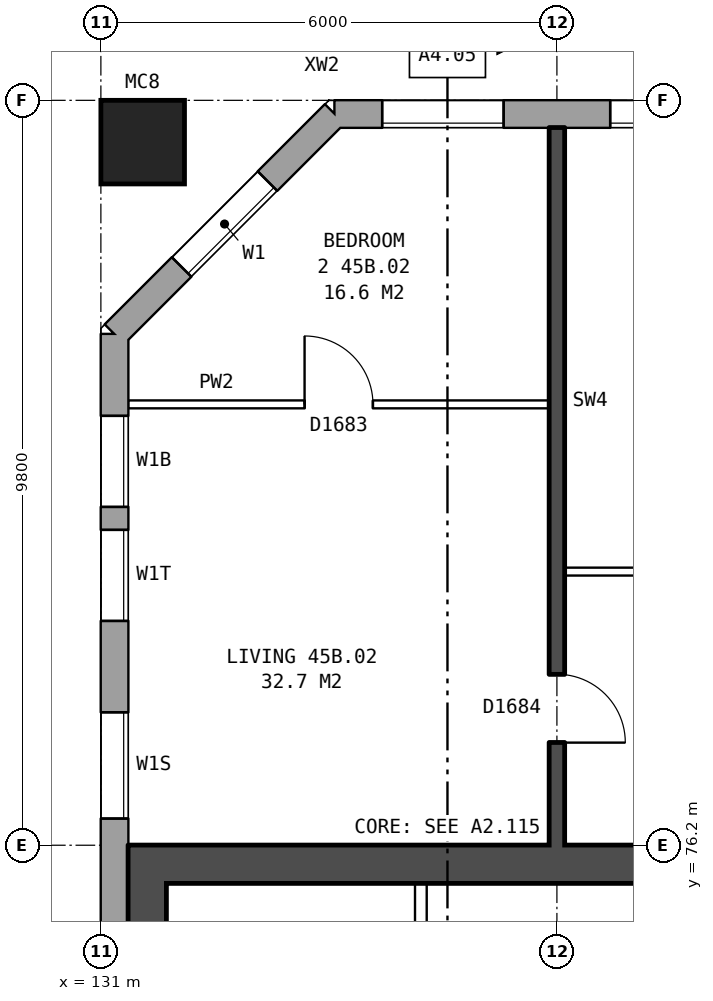
"""IFC4 building model, lengths in metres.
Left out: names, types, materials, properties, quantities, classifications, styles, units other than length and angle.
Written with IfcOpenShell. Run it as: python <this file> out.ifc"""

import sys

from ifc_helpers import new_model, si_unit, direction, frame, frame_2d, origin, origin_2d, place, context, subcontext, project, spatial, rectangle, hollow_rectangle, extrude, element, fill, save


model = new_model("IFC4")
c1 = context("Model", 3, precision=1e-05, world=origin(), true_north=direction((0.0, 1.0)))
c2 = subcontext(c1, "Body", "Model", "MODEL_VIEW")
j1 = project(units=[si_unit("LENGTHUNIT", "METRE"), si_unit("PLANEANGLEUNIT", "RADIAN")], contexts=[c1])
p1 = place(None, origin())
s1 = spatial("IfcSite", under=j1, at=p1, CompositionType="ELEMENT")
p2 = place(p1, origin())
s2 = spatial("IfcBuilding", under=s1, at=p2, CompositionType="ELEMENT")
p3 = place(p2, frame((0.0, 0.0, 160.9)))
s3 = spatial("IfcBuildingStorey", under=s2, at=p3, CompositionType="ELEMENT", Elevation=160.9)
p4 = place(p3, frame((131.55, 85.45, 0.0), z_axis=(0.0, 0.0, 1.0), x_axis=(1.0, 0.0, 0.0)))
e1 = element("IfcColumn", 1, at=p4, inside=s3, PredefinedType="COLUMN", context=c2, shape_type="SweptSolid", body=[
    extrude(hollow_rectangle(XDim=1.1, YDim=1.1, WallThickness=0.06, at=origin_2d()), origin(), (0.0, 0.0, 1.0), 3.1),
])
p5 = place(p3, frame((168.425, 85.82, 0.0), z_axis=(0.0, 0.0, 1.0), x_axis=(-1.0, 0.0, 0.0)))
e2 = element("IfcWall", 2, at=p5, inside=s3, PredefinedType="STANDARD", context=c2, shape_type="SweptSolid", body=[
    extrude(rectangle(XDim=34.351, YDim=0.36, at=frame_2d((17.175, 0.0))), origin(), (0.0, 0.0, 1.0), 2.85),
])
p6 = place(p5, frame((2.125, 0.0, 0.8)))
e3 = element("IfcOpeningElement", 3, at=p6, cuts=e2, PredefinedType="OPENING", context=c2, shape_type="SweptSolid", body=[
    extrude(rectangle(XDim=1.6, YDim=1.8, at=frame_2d((0.8, 0.9))), frame((0.0, 0.19, 0.0), z_axis=(0.0, -1.0, 0.0), x_axis=(1.0, 0.0, 0.0)), (0.0, 0.0, 1.0), 0.38),
])
p7 = place(p5, frame((5.125, 0.0, 0.8)))
e4 = element("IfcOpeningElement", 4, at=p7, cuts=e2, PredefinedType="OPENING", context=c2, shape_type="SweptSolid", body=[
    extrude(rectangle(XDim=1.6, YDim=1.8, at=frame_2d((0.8, 0.9))), frame((0.0, 0.19, 0.0), z_axis=(0.0, -1.0, 0.0), x_axis=(1.0, 0.0, 0.0)), (0.0, 0.0, 1.0), 0.38),
])
p8 = place(p5, frame((8.125, 0.0, 0.8)))
e5 = element("IfcOpeningElement", 5, at=p8, cuts=e2, PredefinedType="OPENING", context=c2, shape_type="SweptSolid", body=[
    extrude(rectangle(XDim=1.6, YDim=1.8, at=frame_2d((0.8, 0.9))), frame((0.0, 0.19, 0.0), z_axis=(0.0, -1.0, 0.0), x_axis=(1.0, 0.0, 0.0)), (0.0, 0.0, 1.0), 0.38),
])
p9 = place(p5, frame((10.025, 0.0, 0.8)))
e6 = element("IfcOpeningElement", 6, at=p9, cuts=e2, PredefinedType="OPENING", context=c2, shape_type="SweptSolid", body=[
    extrude(rectangle(XDim=1.0, YDim=1.8, at=frame_2d((0.5, 0.9))), frame((0.0, 0.19, 0.0), z_axis=(0.0, -1.0, 0.0), x_axis=(1.0, 0.0, 0.0)), (0.0, 0.0, 1.0), 0.38),
])
p10 = place(p5, frame((14.125, 0.0, 0.8)))
e7 = element("IfcOpeningElement", 7, at=p10, cuts=e2, PredefinedType="OPENING", context=c2, shape_type="SweptSolid", body=[
    extrude(rectangle(XDim=1.6, YDim=1.8, at=frame_2d((0.8, 0.9))), frame((0.0, 0.19, 0.0), z_axis=(0.0, -1.0, 0.0), x_axis=(1.0, 0.0, 0.0)), (0.0, 0.0, 1.0), 0.38),
])
p11 = place(p5, frame((17.125, 0.0, 0.8)))
e8 = element("IfcOpeningElement", 8, at=p11, cuts=e2, PredefinedType="OPENING", context=c2, shape_type="SweptSolid", body=[
    extrude(rectangle(XDim=1.6, YDim=1.8, at=frame_2d((0.8, 0.9))), frame((0.0, 0.19, 0.0), z_axis=(0.0, -1.0, 0.0), x_axis=(1.0, 0.0, 0.0)), (0.0, 0.0, 1.0), 0.38),
])
p12 = place(p5, frame((19.625, 0.0, 0.65)))
e9 = element("IfcOpeningElement", 9, at=p12, cuts=e2, PredefinedType="OPENING", context=c2, shape_type="SweptSolid", body=[
    extrude(rectangle(XDim=0.6, YDim=1.8, at=frame_2d((0.3, 0.9))), frame((0.0, 0.19, 0.0), z_axis=(0.0, -1.0, 0.0), x_axis=(1.0, 0.0, 0.0)), (0.0, 0.0, 1.0), 0.38),
])
p13 = place(p5, frame((23.125, 0.0, 0.8)))
e10 = element("IfcOpeningElement", 10, at=p13, cuts=e2, PredefinedType="OPENING", context=c2, shape_type="SweptSolid", body=[
    extrude(rectangle(XDim=1.6, YDim=1.8, at=frame_2d((0.8, 0.9))), frame((0.0, 0.19, 0.0), z_axis=(0.0, -1.0, 0.0), x_axis=(1.0, 0.0, 0.0)), (0.0, 0.0, 1.0), 0.38),
])
p14 = place(p5, frame((26.125, 0.0, 0.8)))
e11 = element("IfcOpeningElement", 11, at=p14, cuts=e2, PredefinedType="OPENING", context=c2, shape_type="SweptSolid", body=[
    extrude(rectangle(XDim=1.6, YDim=1.8, at=frame_2d((0.8, 0.9))), frame((0.0, 0.19, 0.0), z_axis=(0.0, -1.0, 0.0), x_axis=(1.0, 0.0, 0.0)), (0.0, 0.0, 1.0), 0.38),
])
p15 = place(p5, frame((29.125, 0.0, 0.8)))
e12 = element("IfcOpeningElement", 12, at=p15, cuts=e2, PredefinedType="OPENING", context=c2, shape_type="SweptSolid", body=[
    extrude(rectangle(XDim=1.6, YDim=1.8, at=frame_2d((0.8, 0.9))), frame((0.0, 0.19, 0.0), z_axis=(0.0, -1.0, 0.0), x_axis=(1.0, 0.0, 0.0)), (0.0, 0.0, 1.0), 0.38),
])
p16 = place(p5, frame((32.125, 0.0, 0.8)))
e13 = element("IfcOpeningElement", 13, at=p16, cuts=e2, PredefinedType="OPENING", context=c2, shape_type="SweptSolid", body=[
    extrude(rectangle(XDim=1.6, YDim=1.8, at=frame_2d((0.8, 0.9))), frame((0.0, 0.19, 0.0), z_axis=(0.0, -1.0, 0.0), x_axis=(1.0, 0.0, 0.0)), (0.0, 0.0, 1.0), 0.38),
])
p17 = place(p5, frame((11.325, 0.0, 1.7)))
e14 = element("IfcOpeningElement", 14, at=p17, cuts=e2, PredefinedType="OPENING", context=c2, shape_type="SweptSolid", body=[
    extrude(rectangle(XDim=0.8, YDim=0.9, at=frame_2d((0.4, 0.45))), frame((0.0, 0.19, 0.0), z_axis=(0.0, -1.0, 0.0), x_axis=(1.0, 0.0, 0.0)), (0.0, 0.0, 1.0), 0.38),
])
p18 = place(p5, frame((20.525, 0.0, 0.55)))
e15 = element("IfcOpeningElement", 15, at=p18, cuts=e2, PredefinedType="OPENING", context=c2, shape_type="SweptSolid", body=[
    extrude(rectangle(XDim=0.8, YDim=0.9, at=frame_2d((0.4, 0.45))), frame((0.0, 0.19, 0.0), z_axis=(0.0, -1.0, 0.0), x_axis=(1.0, 0.0, 0.0)), (0.0, 0.0, 1.0), 0.38),
])
p19 = place(p3, frame((134.075, 85.82, 0.0), z_axis=(0.0, 0.0, 1.0), x_axis=(-0.707106781187, -0.707106781187, 0.0)))
e16 = element("IfcWall", 16, at=p19, inside=s3, PredefinedType="STANDARD", context=c2, shape_type="SweptSolid", body=[
    extrude(rectangle(XDim=4.094, YDim=0.36, at=frame_2d((2.047, 0.0))), origin(), (0.0, 0.0, 1.0), 2.85),
])
p20 = place(p19, frame((1.247, 0.0, 0.8)))
e17 = element("IfcOpeningElement", 17, at=p20, cuts=e16, PredefinedType="OPENING", context=c2, shape_type="SweptSolid", body=[
    extrude(rectangle(XDim=1.6, YDim=1.8, at=frame_2d((0.8, 0.9))), frame((0.0, 0.19, 0.0), z_axis=(0.0, -1.0, 0.0), x_axis=(1.0, 0.0, 0.0)), (0.0, 0.0, 1.0), 0.38),
])
p21 = place(p3, frame((131.18, 82.925, 0.0), z_axis=(0.0, 0.0, 1.0), x_axis=(0.0, -1.0, 0.0)))
e18 = element("IfcWall", 18, at=p21, inside=s3, PredefinedType="STANDARD", context=c2, shape_type="SweptSolid", body=[
    extrude(rectangle(XDim=25.851, YDim=0.36, at=frame_2d((12.925, 0.0))), origin(), (0.0, 0.0, 1.0), 2.85),
])
p22 = place(p21, frame((1.075, 0.0, 0.8)))
e19 = element("IfcOpeningElement", 19, at=p22, cuts=e18, PredefinedType="OPENING", context=c2, shape_type="SweptSolid", body=[
    extrude(rectangle(XDim=1.2, YDim=1.8, at=frame_2d((0.6, 0.9))), frame((0.0, 0.19, 0.0), z_axis=(0.0, -1.0, 0.0), x_axis=(1.0, 0.0, 0.0)), (0.0, 0.0, 1.0), 0.38),
])
p23 = place(p21, frame((2.575, 0.0, 0.8)))
e20 = element("IfcOpeningElement", 20, at=p23, cuts=e18, PredefinedType="OPENING", context=c2, shape_type="SweptSolid", body=[
    extrude(rectangle(XDim=1.2, YDim=0.9, at=frame_2d((0.6, 0.45))), frame((0.0, 0.19, 0.0), z_axis=(0.0, -1.0, 0.0), x_axis=(1.0, 0.0, 0.0)), (0.0, 0.0, 1.0), 0.38),
])
p24 = place(p21, frame((19.475, 0.0, 1.65)))
e21 = element("IfcOpeningElement", 21, at=p24, cuts=e18, PredefinedType="OPENING", context=c2, shape_type="SweptSolid", body=[
    extrude(rectangle(XDim=1.2, YDim=0.9, at=frame_2d((0.6, 0.45))), frame((0.0, 0.19, 0.0), z_axis=(0.0, -1.0, 0.0), x_axis=(1.0, 0.0, 0.0)), (0.0, 0.0, 1.0), 0.38),
])
p25 = place(p21, frame((22.425, 0.0, 0.8)))
e22 = element("IfcOpeningElement", 22, at=p25, cuts=e18, PredefinedType="OPENING", context=c2, shape_type="SweptSolid", body=[
    extrude(rectangle(XDim=1.0, YDim=1.2, at=frame_2d((0.5, 0.6))), frame((0.0, 0.19, 0.0), z_axis=(0.0, -1.0, 0.0), x_axis=(1.0, 0.0, 0.0)), (0.0, 0.0, 1.0), 0.38),
])
p26 = place(p21, frame((4.975, 0.0, 1.7)))
e23 = element("IfcOpeningElement", 23, at=p26, cuts=e18, PredefinedType="OPENING", context=c2, shape_type="SweptSolid", body=[
    extrude(rectangle(XDim=1.4, YDim=0.9, at=frame_2d((0.7, 0.45))), frame((0.0, 0.19, 0.0), z_axis=(0.0, -1.0, 0.0), x_axis=(1.0, 0.0, 0.0)), (0.0, 0.0, 1.0), 0.38),
])
p27 = place(p21, frame((21.175, 0.0, 0.35)))
e24 = element("IfcOpeningElement", 24, at=p27, cuts=e18, PredefinedType="OPENING", context=c2, shape_type="SweptSolid", body=[
    extrude(rectangle(XDim=0.6, YDim=0.9, at=frame_2d((0.3, 0.45))), frame((0.0, 0.19, 0.0), z_axis=(0.0, -1.0, 0.0), x_axis=(1.0, 0.0, 0.0)), (0.0, 0.0, 1.0), 0.38),
])
p28 = place(p21, frame((23.725, 0.0, 0.8)))
e25 = element("IfcOpeningElement", 25, at=p28, cuts=e18, PredefinedType="OPENING", context=c2, shape_type="SweptSolid", body=[
    extrude(rectangle(XDim=1.4, YDim=1.8, at=frame_2d((0.7, 0.9))), frame((0.0, 0.19, 0.0), z_axis=(0.0, -1.0, 0.0), x_axis=(1.0, 0.0, 0.0)), (0.0, 0.0, 1.0), 0.38),
])
p29 = place(p3, frame((131.61, 63.8, 0.0), z_axis=(0.0, 0.0, 1.0), x_axis=(0.0, 1.0, 0.0)))
e26 = element("IfcWall", 26, at=p29, inside=s3, PredefinedType="SHEAR", context=c2, shape_type="SweptSolid", body=[
    extrude(rectangle(XDim=12.4, YDim=0.5, at=frame_2d((6.2, 0.0))), origin(), (0.0, 0.0, 1.0), 2.85),
])
p30 = place(p3, frame((139.26, 75.95, 0.0), z_axis=(0.0, 0.0, 1.0), x_axis=(-1.0, 0.0, 0.0)))
e27 = element("IfcWall", 27, at=p30, inside=s3, PredefinedType="SHEAR", context=c2, shape_type="SweptSolid", body=[
    extrude(rectangle(XDim=7.4, YDim=0.5, at=frame_2d((3.7, 0.0))), origin(), (0.0, 0.0, 1.0), 2.85),
])
p31 = place(p3, frame((135.21, 71.375, 0.0), z_axis=(0.0, 0.0, 1.0), x_axis=(0.0, 1.0, 0.0)))
e28 = element("IfcWall", 28, at=p31, inside=s3, PredefinedType="PARTITIONING", context=c2, shape_type="SweptSolid", body=[
    extrude(rectangle(XDim=4.325, YDim=0.15, at=frame_2d((2.163, 0.0))), origin(), (0.0, 0.0, 1.0), 2.85),
])
p32 = place(p31, frame((2.65, 0.0, 0.0)))
e29 = element("IfcOpeningElement", 29, at=p32, cuts=e28, PredefinedType="OPENING", context=c2, shape_type="SweptSolid", body=[
    extrude(rectangle(XDim=1.1, YDim=2.1, at=frame_2d((0.55, 1.05))), frame((0.0, 0.085, 0.0), z_axis=(0.0, -1.0, 0.0), x_axis=(1.0, 0.0, 0.0)), (0.0, 0.0, 1.0), 0.17),
])
p33 = place(p3, frame((137.1, 79.8, 0.0), z_axis=(0.0, 0.0, 1.0), x_axis=(1.0, 0.0, 0.0)))
e30 = element("IfcWall", 30, at=p33, inside=s3, PredefinedType="PARTITIONING", context=c2, shape_type="SweptSolid", body=[
    extrude(rectangle(XDim=5.8, YDim=0.1, at=frame_2d((2.9, 0.0))), origin(), (0.0, 0.0, 1.0), 2.85),
])
p34 = place(p33, frame((1.3, 0.0, 0.0)))
e31 = element("IfcOpeningElement", 31, at=p34, cuts=e30, PredefinedType="OPENING", context=c2, shape_type="SweptSolid", body=[
    extrude(rectangle(XDim=0.9, YDim=2.1, at=frame_2d((0.45, 1.05))), frame((0.0, 0.06, 0.0), z_axis=(0.0, -1.0, 0.0), x_axis=(1.0, 0.0, 0.0)), (0.0, 0.0, 1.0), 0.12),
])
p35 = place(p33, frame((4.2, 0.0, 0.0)))
e32 = element("IfcOpeningElement", 32, at=p35, cuts=e30, PredefinedType="OPENING", context=c2, shape_type="SweptSolid", body=[
    extrude(rectangle(XDim=0.9, YDim=2.1, at=frame_2d((0.45, 1.05))), frame((0.0, 0.06, 0.0), z_axis=(0.0, -1.0, 0.0), x_axis=(1.0, 0.0, 0.0)), (0.0, 0.0, 1.0), 0.12),
])
p36 = place(p3, frame((131.36, 82.0, 0.0), z_axis=(0.0, 0.0, 1.0), x_axis=(1.0, 0.0, 0.0)))
e33 = element("IfcWall", 33, at=p36, inside=s3, PredefinedType="PARTITIONING", context=c2, shape_type="SweptSolid", body=[
    extrude(rectangle(XDim=5.54, YDim=0.1, at=frame_2d((2.77, 0.0))), origin(), (0.0, 0.0, 1.0), 2.85),
])
p37 = place(p36, frame((2.32, 0.0, 0.0)))
e34 = element("IfcOpeningElement", 34, at=p37, cuts=e33, PredefinedType="OPENING", context=c2, shape_type="SweptSolid", body=[
    extrude(rectangle(XDim=0.9, YDim=2.1, at=frame_2d((0.45, 1.05))), frame((0.0, 0.06, 0.0), z_axis=(0.0, -1.0, 0.0), x_axis=(1.0, 0.0, 0.0)), (0.0, 0.0, 1.0), 0.12),
])
p38 = place(p3, frame((137.0, 76.2, 0.0), z_axis=(0.0, 0.0, 1.0), x_axis=(0.0, 1.0, 0.0)))
e35 = element("IfcWall", 35, at=p38, inside=s3, PredefinedType="SOLIDWALL", context=c2, shape_type="SweptSolid", body=[
    extrude(rectangle(XDim=9.44, YDim=0.2, at=frame_2d((4.72, 0.0))), origin(), (0.0, 0.0, 1.0), 2.85),
])
p39 = place(p38, frame((1.35, 0.0, 0.0)))
e36 = element("IfcOpeningElement", 36, at=p39, cuts=e35, PredefinedType="OPENING", context=c2, shape_type="SweptSolid", body=[
    extrude(rectangle(XDim=0.9, YDim=2.1, at=frame_2d((0.45, 1.05))), frame((0.0, 0.11, 0.0), z_axis=(0.0, -1.0, 0.0), x_axis=(1.0, 0.0, 0.0)), (0.0, 0.0, 1.0), 0.22),
])
p40 = place(p15, origin())
e37 = element("IfcWindow", 37, at=p40, inside=s3, PartitioningType="SINGLE_PANEL", PredefinedType="WINDOW", context=c2, shape_type="SweptSolid", body=[
    extrude(rectangle(XDim=1.6, YDim=1.8, at=frame_2d((0.8, 0.9))), frame((0.0, 0.15, 0.0), z_axis=(0.0, -1.0, 0.0), x_axis=(1.0, 0.0, 0.0)), (0.0, 0.0, 1.0), 0.06),
])
fill(e12, e37)
p41 = place(p16, origin())
e38 = element("IfcWindow", 38, at=p41, inside=s3, PartitioningType="SINGLE_PANEL", PredefinedType="WINDOW", context=c2, shape_type="SweptSolid", body=[
    extrude(rectangle(XDim=1.6, YDim=1.8, at=frame_2d((0.8, 0.9))), frame((0.0, 0.15, 0.0), z_axis=(0.0, -1.0, 0.0), x_axis=(1.0, 0.0, 0.0)), (0.0, 0.0, 1.0), 0.06),
])
fill(e13, e38)
p42 = place(p20, origin())
e39 = element("IfcWindow", 39, at=p42, inside=s3, PartitioningType="SINGLE_PANEL", PredefinedType="WINDOW", context=c2, shape_type="SweptSolid", body=[
    extrude(rectangle(XDim=1.6, YDim=1.8, at=frame_2d((0.8, 0.9))), frame((0.0, 0.15, 0.0), z_axis=(0.0, -1.0, 0.0), x_axis=(1.0, 0.0, 0.0)), (0.0, 0.0, 1.0), 0.06),
])
fill(e17, e39)
p43 = place(p22, origin())
e40 = element("IfcWindow", 40, at=p43, inside=s3, PartitioningType="SINGLE_PANEL", PredefinedType="WINDOW", context=c2, shape_type="SweptSolid", body=[
    extrude(rectangle(XDim=1.2, YDim=1.8, at=frame_2d((0.6, 0.9))), frame((0.0, 0.15, 0.0), z_axis=(0.0, -1.0, 0.0), x_axis=(1.0, 0.0, 0.0)), (0.0, 0.0, 1.0), 0.06),
])
fill(e19, e40)
p44 = place(p23, origin())
e41 = element("IfcWindow", 41, at=p44, inside=s3, PartitioningType="SINGLE_PANEL", PredefinedType="WINDOW", context=c2, shape_type="SweptSolid", body=[
    extrude(rectangle(XDim=1.2, YDim=0.9, at=frame_2d((0.6, 0.45))), frame((0.0, 0.15, 0.0), z_axis=(0.0, -1.0, 0.0), x_axis=(1.0, 0.0, 0.0)), (0.0, 0.0, 1.0), 0.06),
])
fill(e20, e41)
p45 = place(p37, origin())
e42 = element("IfcDoor", 42, at=p45, inside=s3, OperationType="SINGLE_SWING_LEFT", PredefinedType="DOOR", context=c2, shape_type="SweptSolid", body=[
    extrude(rectangle(XDim=0.9, YDim=2.1, at=frame_2d((0.45, 1.05))), frame((0.0, 0.025, 0.0), z_axis=(0.0, -1.0, 0.0), x_axis=(1.0, 0.0, 0.0)), (0.0, 0.0, 1.0), 0.05),
])
fill(e34, e42)
p46 = place(p39, frame((0.9, 0.0, 0.0), z_axis=(0.0, 0.0, 1.0), x_axis=(-1.0, 0.0, 0.0)))
e43 = element("IfcDoor", 43, at=p46, inside=s3, OperationType="SINGLE_SWING_RIGHT", PredefinedType="DOOR", context=c2, shape_type="SweptSolid", body=[
    extrude(rectangle(XDim=0.9, YDim=2.1, at=frame_2d((0.45, 1.05))), frame((0.0, 0.025, 0.0), z_axis=(0.0, -1.0, 0.0), x_axis=(1.0, 0.0, 0.0)), (0.0, 0.0, 1.0), 0.05),
])
fill(e36, e43)
p47 = place(p26, origin())
e44 = element("IfcWindow", 44, at=p47, inside=s3, PartitioningType="SINGLE_PANEL", PredefinedType="WINDOW", context=c2, shape_type="SweptSolid", body=[
    extrude(rectangle(XDim=1.4, YDim=0.9, at=frame_2d((0.7, 0.45))), frame((0.0, 0.15, 0.0), z_axis=(0.0, -1.0, 0.0), x_axis=(1.0, 0.0, 0.0)), (0.0, 0.0, 1.0), 0.06),
])
fill(e23, e44)
save(model, sys.argv[1])
